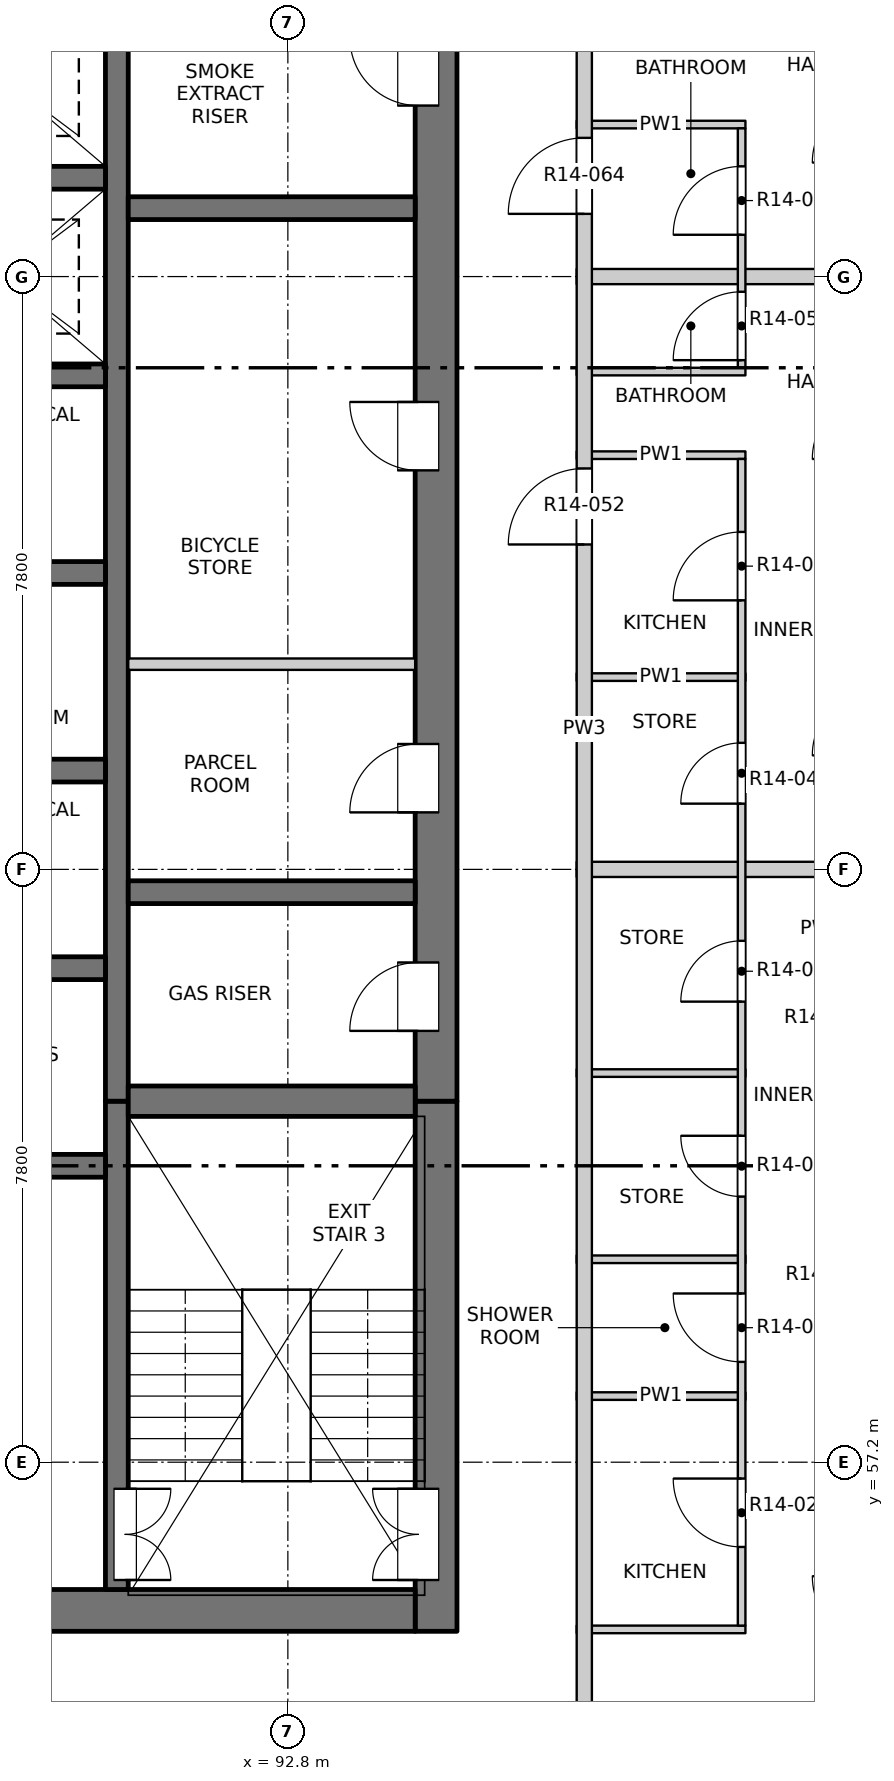
"""IFC4 building model, lengths in metres.
Left out: names, types, materials, properties, quantities, classifications, styles, units other than length and angle.
Written with IfcOpenShell. Run it as: python <this file> out.ifc"""

import sys

from ifc_helpers import new_model, si_unit, direction, frame, frame_2d, origin, place, context, subcontext, project, spatial, rectangle, extrude, element, fill, save


model = new_model("IFC4")
c1 = context("Model", 3, precision=1e-05, world=origin(), true_north=direction((0.0, 1.0)))
c2 = subcontext(c1, "Body", "Model", "MODEL_VIEW")
j1 = project(units=[si_unit("LENGTHUNIT", "METRE"), si_unit("PLANEANGLEUNIT", "RADIAN")], contexts=[c1])
p1 = place(None, origin())
s1 = spatial("IfcSite", under=j1, at=p1, CompositionType="ELEMENT")
p2 = place(p1, origin())
s2 = spatial("IfcBuilding", under=s1, at=p2, CompositionType="ELEMENT")
p3 = place(p2, frame((0.0, 0.0, 148.6)))
s3 = spatial("IfcBuildingStorey", under=s2, at=p3, CompositionType="ELEMENT", Elevation=148.6)
p4 = place(p3, frame((94.75, 54.975, -0.3), z_axis=(0.0, 0.0, 1.0), x_axis=(0.0, 1.0, 0.0)))
e1 = element("IfcWall", 1, at=p4, inside=s3, PredefinedType="SOLIDWALL", context=c2, shape_type="SweptSolid", body=[
    extrude(rectangle(XDim=6.975, YDim=0.55, at=frame_2d((3.487, 0.0))), origin(), (0.0, 0.0, 1.0), 3.45),
])
p5 = place(p4, frame((0.675, 0.0, 0.3)))
e2 = element("IfcOpeningElement", 2, at=p5, cuts=e1, PredefinedType="OPENING", context=c2, shape_type="SweptSolid", body=[
    extrude(rectangle(XDim=1.2, YDim=2.1, at=frame_2d((0.6, 1.05))), frame((0.0, 0.285, 0.0), z_axis=(0.0, -1.0, 0.0), x_axis=(1.0, 0.0, 0.0)), (0.0, 0.0, 1.0), 0.57),
])
p6 = place(p3, frame((94.75, 61.95, -0.3), z_axis=(0.0, 0.0, 1.0), x_axis=(0.0, 1.0, 0.0)))
e3 = element("IfcWall", 3, at=p6, inside=s3, PredefinedType="SOLIDWALL", context=c2, shape_type="SweptSolid", body=[
    extrude(rectangle(XDim=15.35, YDim=0.55, at=frame_2d((7.675, 0.0))), origin(), (0.0, 0.0, 1.0), 3.45),
])
p7 = place(p6, frame((0.925, 0.0, 0.3)))
e4 = element("IfcOpeningElement", 4, at=p7, cuts=e3, PredefinedType="OPENING", context=c2, shape_type="SweptSolid", body=[
    extrude(rectangle(XDim=0.9, YDim=2.1, at=frame_2d((0.45, 1.05))), frame((0.0, 0.285, 0.0), z_axis=(0.0, -1.0, 0.0), x_axis=(1.0, 0.0, 0.0)), (0.0, 0.0, 1.0), 0.57),
])
p8 = place(p6, frame((3.8, 0.0, 0.3)))
e5 = element("IfcOpeningElement", 5, at=p8, cuts=e3, PredefinedType="OPENING", context=c2, shape_type="SweptSolid", body=[
    extrude(rectangle(XDim=0.9, YDim=2.1, at=frame_2d((0.45, 1.05))), frame((0.0, 0.285, 0.0), z_axis=(0.0, -1.0, 0.0), x_axis=(1.0, 0.0, 0.0)), (0.0, 0.0, 1.0), 0.57),
])
p9 = place(p6, frame((8.3, 0.0, 0.3)))
e6 = element("IfcOpeningElement", 6, at=p9, cuts=e3, PredefinedType="OPENING", context=c2, shape_type="SweptSolid", body=[
    extrude(rectangle(XDim=0.9, YDim=2.1, at=frame_2d((0.45, 1.05))), frame((0.0, 0.285, 0.0), z_axis=(0.0, -1.0, 0.0), x_axis=(1.0, 0.0, 0.0)), (0.0, 0.0, 1.0), 0.57),
])
p10 = place(p6, frame((13.1, 0.0, 0.3)))
e7 = element("IfcOpeningElement", 7, at=p10, cuts=e3, PredefinedType="OPENING", context=c2, shape_type="SweptSolid", body=[
    extrude(rectangle(XDim=0.9, YDim=2.1, at=frame_2d((0.45, 1.05))), frame((0.0, 0.285, 0.0), z_axis=(0.0, -1.0, 0.0), x_axis=(1.0, 0.0, 0.0)), (0.0, 0.0, 1.0), 0.57),
])
p11 = place(p3, frame((75.525, 55.25, -0.3), z_axis=(0.0, 0.0, 1.0), x_axis=(1.0, 0.0, 0.0)))
e8 = element("IfcWall", 8, at=p11, inside=s3, PredefinedType="SOLIDWALL", context=c2, shape_type="SweptSolid", body=[
    extrude(rectangle(XDim=18.95, YDim=0.55, at=frame_2d((9.475, 0.0))), origin(), (0.0, 0.0, 1.0), 3.45),
])
p12 = place(p11, frame((8.725, 0.0, 0.3)))
e9 = element("IfcOpeningElement", 9, at=p12, cuts=e8, PredefinedType="OPENING", context=c2, shape_type="SweptSolid", body=[
    extrude(rectangle(XDim=1.5, YDim=2.1, at=frame_2d((0.75, 1.05))), frame((0.0, 0.285, 0.0), z_axis=(0.0, -1.0, 0.0), x_axis=(1.0, 0.0, 0.0)), (0.0, 0.0, 1.0), 0.57),
])
p13 = place(p3, frame((90.55, 55.525, -0.3), z_axis=(0.0, 0.0, 1.0), x_axis=(0.0, 1.0, 0.0)))
e10 = element("IfcWall", 10, at=p13, inside=s3, PredefinedType="SOLIDWALL", context=c2, shape_type="SweptSolid", body=[
    extrude(rectangle(XDim=6.425, YDim=0.3, at=frame_2d((3.212, 0.0))), origin(), (0.0, 0.0, 1.0), 3.45),
])
p14 = place(p13, frame((0.125, 0.0, 0.3)))
e11 = element("IfcOpeningElement", 11, at=p14, cuts=e10, PredefinedType="OPENING", context=c2, shape_type="SweptSolid", body=[
    extrude(rectangle(XDim=1.2, YDim=2.1, at=frame_2d((0.6, 1.05))), frame((0.0, 0.16, 0.0), z_axis=(0.0, -1.0, 0.0), x_axis=(1.0, 0.0, 0.0)), (0.0, 0.0, 1.0), 0.32),
])
p15 = place(p3, frame((90.55, 61.95, -0.3), z_axis=(0.0, 0.0, 1.0), x_axis=(0.0, 1.0, 0.0)))
e12 = element("IfcWall", 12, at=p15, inside=s3, PredefinedType="SOLIDWALL", context=c2, shape_type="SweptSolid", body=[
    extrude(rectangle(XDim=15.35, YDim=0.3, at=frame_2d((7.675, 0.0))), origin(), (0.0, 0.0, 1.0), 3.45),
])
for number, where, z_axis, x_axis in (
    (13, (87.4, 61.1, -0.3), (0.0, 0.0, 1.0), (1.0, 0.0, 0.0)),
    (14, (87.4, 63.7, -0.3), (0.0, 0.0, 1.0), (1.0, 0.0, 0.0)),
    (15, (87.4, 66.3, -0.3), (0.0, 0.0, 1.0), (1.0, 0.0, 0.0)),
    (16, (87.4, 68.9, -0.3), (0.0, 0.0, 1.0), (1.0, 0.0, 0.0)),
    (17, (87.4, 71.5, -0.3), (0.0, 0.0, 1.0), (1.0, 0.0, 0.0)),
    (18, (87.4, 74.1, -0.3), (0.0, 0.0, 1.0), (1.0, 0.0, 0.0)),
):
    element("IfcWall", number, at=place(p3, frame(where, z_axis=z_axis, x_axis=x_axis)), inside=s3, PredefinedType="SOLIDWALL", context=c2, shape_type="SweptSolid", body=[
        extrude(rectangle(XDim=3.0, YDim=0.3, at=frame_2d((1.5, 0.0))), origin(), (0.0, 0.0, 1.0), 3.45),
    ])
p16 = place(p3, frame((90.7, 61.95, -0.3), z_axis=(0.0, 0.0, 1.0), x_axis=(1.0, 0.0, 0.0)))
e19 = element("IfcWall", 19, at=p16, inside=s3, PredefinedType="SOLIDWALL", context=c2, shape_type="SweptSolid", body=[
    extrude(rectangle(XDim=3.775, YDim=0.4, at=frame_2d((1.888, 0.0))), origin(), (0.0, 0.0, 1.0), 3.45),
])
for number, where, z_axis, x_axis in (
    (20, (90.7, 64.7, -0.3), (0.0, 0.0, 1.0), (1.0, 0.0, 0.0)),
    (21, (90.7, 73.7, -0.3), (0.0, 0.0, 1.0), (1.0, 0.0, 0.0)),
):
    element("IfcWall", number, at=place(p3, frame(where, z_axis=z_axis, x_axis=x_axis)), inside=s3, PredefinedType="SOLIDWALL", context=c2, shape_type="SweptSolid", body=[
        extrude(rectangle(XDim=3.775, YDim=0.3, at=frame_2d((1.888, 0.0))), origin(), (0.0, 0.0, 1.0), 3.45),
    ])
for number, where, z_axis, x_axis in (
    (22, (96.6, 55.0, 0.0), (0.0, 0.0, 1.0), (1.0, 0.0, 0.0)),
    (23, (96.6, 58.07, 0.0), (0.0, 0.0, 1.0), (1.0, 0.0, 0.0)),
    (24, (96.6, 59.87, 0.0), (0.0, 0.0, 1.0), (1.0, 0.0, 0.0)),
    (25, (96.6, 62.32, 0.0), (0.0, 0.0, 1.0), (1.0, 0.0, 0.0)),
):
    element("IfcWall", number, at=place(p3, frame(where, z_axis=z_axis, x_axis=x_axis)), inside=s3, PredefinedType="PARTITIONING", context=c2, shape_type="SweptSolid", body=[
        extrude(rectangle(XDim=2.22, YDim=0.1, at=frame_2d((1.11, 0.0))), origin(), (0.0, 0.0, 1.0), 3.15),
    ])
p17 = place(p3, frame((96.6, 65.0, 0.0), z_axis=(0.0, 0.0, 1.0), x_axis=(1.0, 0.0, 0.0)))
e26 = element("IfcWall", 26, at=p17, inside=s3, PredefinedType="PARTITIONING", context=c2, shape_type="SweptSolid", body=[
    extrude(rectangle(XDim=7.6, YDim=0.2, at=frame_2d((3.8, 0.0))), origin(), (0.0, 0.0, 1.0), 3.15),
])
p18 = place(p3, frame((96.6, 67.53, 0.0), z_axis=(0.0, 0.0, 1.0), x_axis=(1.0, 0.0, 0.0)))
e27 = element("IfcWall", 27, at=p18, inside=s3, PredefinedType="PARTITIONING", context=c2, shape_type="SweptSolid", body=[
    extrude(rectangle(XDim=2.22, YDim=0.1, at=frame_2d((1.11, 0.0))), origin(), (0.0, 0.0, 1.0), 3.15),
])
p19 = place(p3, frame((90.7, 67.7, 0.0), z_axis=(0.0, 0.0, 1.0), x_axis=(1.0, 0.0, 0.0)))
e28 = element("IfcWall", 28, at=p19, inside=s3, PredefinedType="PARTITIONING", context=c2, shape_type="SweptSolid", body=[
    extrude(rectangle(XDim=3.775, YDim=0.15, at=frame_2d((1.887, 0.0))), origin(), (0.0, 0.0, 1.0), 3.15),
])
for number, where, z_axis, x_axis in (
    (29, (96.6, 70.45, 0.0), (0.0, 0.0, 1.0), (1.0, 0.0, 0.0)),
    (30, (96.6, 71.55, 0.0), (0.0, 0.0, 1.0), (1.0, 0.0, 0.0)),
):
    element("IfcWall", number, at=place(p3, frame(where, z_axis=z_axis, x_axis=x_axis)), inside=s3, PredefinedType="PARTITIONING", context=c2, shape_type="SweptSolid", body=[
        extrude(rectangle(XDim=2.22, YDim=0.1, at=frame_2d((1.11, 0.0))), origin(), (0.0, 0.0, 1.0), 3.15),
    ])
p20 = place(p3, frame((96.6, 72.8, 0.0), z_axis=(0.0, 0.0, 1.0), x_axis=(1.0, 0.0, 0.0)))
e31 = element("IfcWall", 31, at=p20, inside=s3, PredefinedType="PARTITIONING", context=c2, shape_type="SweptSolid", body=[
    extrude(rectangle(XDim=7.6, YDim=0.2, at=frame_2d((3.8, 0.0))), origin(), (0.0, 0.0, 1.0), 3.15),
])
p21 = place(p3, frame((96.6, 74.8, 0.0), z_axis=(0.0, 0.0, 1.0), x_axis=(1.0, 0.0, 0.0)))
e32 = element("IfcWall", 32, at=p21, inside=s3, PredefinedType="PARTITIONING", context=c2, shape_type="SweptSolid", body=[
    extrude(rectangle(XDim=2.22, YDim=0.1, at=frame_2d((1.11, 0.0))), origin(), (0.0, 0.0, 1.0), 3.15),
])
p22 = place(p3, frame((96.7, 49.5, 0.0), z_axis=(0.0, 0.0, 1.0), x_axis=(0.0, 1.0, 0.0)))
e33 = element("IfcWall", 33, at=p22, inside=s3, PredefinedType="PARTITIONING", context=c2, shape_type="SweptSolid", body=[
    extrude(rectangle(XDim=34.7, YDim=0.2, at=frame_2d((17.35, 0.0))), origin(), (0.0, 0.0, 1.0), 3.15),
])
p23 = place(p22, frame((3.225, 0.0, 0.0)))
e34 = element("IfcOpeningElement", 34, at=p23, cuts=e33, PredefinedType="OPENING", context=c2, shape_type="SweptSolid", body=[
    extrude(rectangle(XDim=1.0, YDim=2.1, at=frame_2d((0.5, 1.05))), frame((0.0, 0.11, 0.0), z_axis=(0.0, -1.0, 0.0), x_axis=(1.0, 0.0, 0.0)), (0.0, 0.0, 1.0), 0.22),
])
p24 = place(p22, frame((19.775, 0.0, 0.0)))
e35 = element("IfcOpeningElement", 35, at=p24, cuts=e33, PredefinedType="OPENING", context=c2, shape_type="SweptSolid", body=[
    extrude(rectangle(XDim=1.0, YDim=2.1, at=frame_2d((0.5, 1.05))), frame((0.0, 0.11, 0.0), z_axis=(0.0, -1.0, 0.0), x_axis=(1.0, 0.0, 0.0)), (0.0, 0.0, 1.0), 0.22),
])
p25 = place(p22, frame((24.125, 0.0, 0.0)))
e36 = element("IfcOpeningElement", 36, at=p25, cuts=e33, PredefinedType="OPENING", context=c2, shape_type="SweptSolid", body=[
    extrude(rectangle(XDim=1.0, YDim=2.1, at=frame_2d((0.5, 1.05))), frame((0.0, 0.11, 0.0), z_axis=(0.0, -1.0, 0.0), x_axis=(1.0, 0.0, 0.0)), (0.0, 0.0, 1.0), 0.22),
])
p26 = place(p3, frame((98.77, 55.05, 0.0), z_axis=(0.0, 0.0, 1.0), x_axis=(0.0, 1.0, 0.0)))
e37 = element("IfcWall", 37, at=p26, inside=s3, PredefinedType="PARTITIONING", context=c2, shape_type="SweptSolid", body=[
    extrude(rectangle(XDim=15.35, YDim=0.1, at=frame_2d((7.675, 0.0))), origin(), (0.0, 0.0, 1.0), 3.15),
])
p27 = place(p26, frame((1.035, 0.0, 0.0)))
e38 = element("IfcOpeningElement", 38, at=p27, cuts=e37, PredefinedType="OPENING", context=c2, shape_type="SweptSolid", body=[
    extrude(rectangle(XDim=0.9, YDim=2.1, at=frame_2d((0.45, 1.05))), frame((0.0, 0.06, 0.0), z_axis=(0.0, -1.0, 0.0), x_axis=(1.0, 0.0, 0.0)), (0.0, 0.0, 1.0), 0.12),
])
p28 = place(p26, frame((3.47, 0.0, 0.0)))
e39 = element("IfcOpeningElement", 39, at=p28, cuts=e37, PredefinedType="OPENING", context=c2, shape_type="SweptSolid", body=[
    extrude(rectangle(XDim=0.9, YDim=2.1, at=frame_2d((0.45, 1.05))), frame((0.0, 0.06, 0.0), z_axis=(0.0, -1.0, 0.0), x_axis=(1.0, 0.0, 0.0)), (0.0, 0.0, 1.0), 0.12),
])
p29 = place(p26, frame((5.645, 0.0, 0.0)))
e40 = element("IfcOpeningElement", 40, at=p29, cuts=e37, PredefinedType="OPENING", context=c2, shape_type="SweptSolid", body=[
    extrude(rectangle(XDim=0.8, YDim=2.1, at=frame_2d((0.4, 1.05))), frame((0.0, 0.06, 0.0), z_axis=(0.0, -1.0, 0.0), x_axis=(1.0, 0.0, 0.0)), (0.0, 0.0, 1.0), 0.12),
])
p30 = place(p26, frame((8.21, 0.0, 0.0)))
e41 = element("IfcOpeningElement", 41, at=p30, cuts=e37, PredefinedType="OPENING", context=c2, shape_type="SweptSolid", body=[
    extrude(rectangle(XDim=0.8, YDim=2.1, at=frame_2d((0.4, 1.05))), frame((0.0, 0.06, 0.0), z_axis=(0.0, -1.0, 0.0), x_axis=(1.0, 0.0, 0.0)), (0.0, 0.0, 1.0), 0.12),
])
p31 = place(p26, frame((10.815, 0.0, 0.0)))
e42 = element("IfcOpeningElement", 42, at=p31, cuts=e37, PredefinedType="OPENING", context=c2, shape_type="SweptSolid", body=[
    extrude(rectangle(XDim=0.8, YDim=2.1, at=frame_2d((0.4, 1.05))), frame((0.0, 0.06, 0.0), z_axis=(0.0, -1.0, 0.0), x_axis=(1.0, 0.0, 0.0)), (0.0, 0.0, 1.0), 0.12),
])
p32 = place(p26, frame((13.49, 0.0, 0.0)))
e43 = element("IfcOpeningElement", 43, at=p32, cuts=e37, PredefinedType="OPENING", context=c2, shape_type="SweptSolid", body=[
    extrude(rectangle(XDim=0.9, YDim=2.1, at=frame_2d((0.45, 1.05))), frame((0.0, 0.06, 0.0), z_axis=(0.0, -1.0, 0.0), x_axis=(1.0, 0.0, 0.0)), (0.0, 0.0, 1.0), 0.12),
])
p33 = place(p3, frame((98.77, 71.6, 0.0), z_axis=(0.0, 0.0, 1.0), x_axis=(0.0, 1.0, 0.0)))
e44 = element("IfcWall", 44, at=p33, inside=s3, PredefinedType="PARTITIONING", context=c2, shape_type="SweptSolid", body=[
    extrude(rectangle(XDim=3.15, YDim=0.1, at=frame_2d((1.575, 0.0))), origin(), (0.0, 0.0, 1.0), 3.15),
])
p34 = place(p33, frame((0.1, 0.0, 0.0)))
e45 = element("IfcOpeningElement", 45, at=p34, cuts=e44, PredefinedType="OPENING", context=c2, shape_type="SweptSolid", body=[
    extrude(rectangle(XDim=0.9, YDim=2.1, at=frame_2d((0.45, 1.05))), frame((0.0, 0.06, 0.0), z_axis=(0.0, -1.0, 0.0), x_axis=(1.0, 0.0, 0.0)), (0.0, 0.0, 1.0), 0.12),
])
p35 = place(p33, frame((1.75, 0.0, 0.0)))
e46 = element("IfcOpeningElement", 46, at=p35, cuts=e44, PredefinedType="OPENING", context=c2, shape_type="SweptSolid", body=[
    extrude(rectangle(XDim=0.9, YDim=2.1, at=frame_2d((0.45, 1.05))), frame((0.0, 0.06, 0.0), z_axis=(0.0, -1.0, 0.0), x_axis=(1.0, 0.0, 0.0)), (0.0, 0.0, 1.0), 0.12),
])
p36 = place(p14, origin())
e47 = element("IfcDoor", 47, at=p36, inside=s3, OperationType="DOUBLE_DOOR_SINGLE_SWING", PredefinedType="DOOR", context=c2, shape_type="SweptSolid", body=[
    extrude(rectangle(XDim=1.2, YDim=2.1, at=frame_2d((0.6, 1.05))), frame((0.0, -0.085, 0.0), z_axis=(0.0, -1.0, 0.0), x_axis=(1.0, 0.0, 0.0)), (0.0, 0.0, 1.0), 0.05),
])
fill(e11, e47)
p37 = place(p5, origin())
e48 = element("IfcDoor", 48, at=p37, inside=s3, OperationType="DOUBLE_DOOR_SINGLE_SWING", PredefinedType="DOOR", context=c2, shape_type="SweptSolid", body=[
    extrude(rectangle(XDim=1.2, YDim=2.1, at=frame_2d((0.6, 1.05))), frame((0.0, 0.26, 0.0), z_axis=(0.0, -1.0, 0.0), x_axis=(1.0, 0.0, 0.0)), (0.0, 0.0, 1.0), 0.05),
])
fill(e2, e48)
p38 = place(p27, origin())
e49 = element("IfcDoor", 49, at=p38, inside=s3, OperationType="SINGLE_SWING_RIGHT", PredefinedType="DOOR", context=c2, shape_type="SweptSolid", body=[
    extrude(rectangle(XDim=0.9, YDim=2.1, at=frame_2d((0.45, 1.05))), frame((0.0, 0.025, 0.0), z_axis=(0.0, -1.0, 0.0), x_axis=(1.0, 0.0, 0.0)), (0.0, 0.0, 1.0), 0.05),
])
fill(e38, e49)
p39 = place(p28, origin())
e50 = element("IfcDoor", 50, at=p39, inside=s3, OperationType="SINGLE_SWING_RIGHT", PredefinedType="DOOR", context=c2, shape_type="SweptSolid", body=[
    extrude(rectangle(XDim=0.9, YDim=2.1, at=frame_2d((0.45, 1.05))), frame((0.0, 0.025, 0.0), z_axis=(0.0, -1.0, 0.0), x_axis=(1.0, 0.0, 0.0)), (0.0, 0.0, 1.0), 0.05),
])
fill(e39, e50)
p40 = place(p29, origin())
e51 = element("IfcDoor", 51, at=p40, inside=s3, OperationType="SINGLE_SWING_RIGHT", PredefinedType="DOOR", context=c2, shape_type="SweptSolid", body=[
    extrude(rectangle(XDim=0.8, YDim=2.1, at=frame_2d((0.4, 1.05))), frame((0.0, 0.025, 0.0), z_axis=(0.0, -1.0, 0.0), x_axis=(1.0, 0.0, 0.0)), (0.0, 0.0, 1.0), 0.05),
])
fill(e40, e51)
p41 = place(p7, origin())
e52 = element("IfcDoor", 52, at=p41, inside=s3, OperationType="SINGLE_SWING_LEFT", PredefinedType="DOOR", context=c2, shape_type="SweptSolid", body=[
    extrude(rectangle(XDim=0.9, YDim=2.1, at=frame_2d((0.45, 1.05))), frame((0.0, 0.26, 0.0), z_axis=(0.0, -1.0, 0.0), x_axis=(1.0, 0.0, 0.0)), (0.0, 0.0, 1.0), 0.05),
])
fill(e4, e52)
p42 = place(p30, origin())
e53 = element("IfcDoor", 53, at=p42, inside=s3, OperationType="SINGLE_SWING_LEFT", PredefinedType="DOOR", context=c2, shape_type="SweptSolid", body=[
    extrude(rectangle(XDim=0.8, YDim=2.1, at=frame_2d((0.4, 1.05))), frame((0.0, 0.025, 0.0), z_axis=(0.0, -1.0, 0.0), x_axis=(1.0, 0.0, 0.0)), (0.0, 0.0, 1.0), 0.05),
])
fill(e41, e53)
p43 = place(p8, origin())
e54 = element("IfcDoor", 54, at=p43, inside=s3, OperationType="SINGLE_SWING_LEFT", PredefinedType="DOOR", context=c2, shape_type="SweptSolid", body=[
    extrude(rectangle(XDim=0.9, YDim=2.1, at=frame_2d((0.45, 1.05))), frame((0.0, 0.26, 0.0), z_axis=(0.0, -1.0, 0.0), x_axis=(1.0, 0.0, 0.0)), (0.0, 0.0, 1.0), 0.05),
])
fill(e5, e54)
p44 = place(p31, origin())
e55 = element("IfcDoor", 55, at=p44, inside=s3, OperationType="SINGLE_SWING_LEFT", PredefinedType="DOOR", context=c2, shape_type="SweptSolid", body=[
    extrude(rectangle(XDim=0.8, YDim=2.1, at=frame_2d((0.4, 1.05))), frame((0.0, 0.025, 0.0), z_axis=(0.0, -1.0, 0.0), x_axis=(1.0, 0.0, 0.0)), (0.0, 0.0, 1.0), 0.05),
])
fill(e42, e55)
p45 = place(p32, origin())
e56 = element("IfcDoor", 56, at=p45, inside=s3, OperationType="SINGLE_SWING_LEFT", PredefinedType="DOOR", context=c2, shape_type="SweptSolid", body=[
    extrude(rectangle(XDim=0.9, YDim=2.1, at=frame_2d((0.45, 1.05))), frame((0.0, 0.025, 0.0), z_axis=(0.0, -1.0, 0.0), x_axis=(1.0, 0.0, 0.0)), (0.0, 0.0, 1.0), 0.05),
])
fill(e43, e56)
p46 = place(p24, origin())
e57 = element("IfcDoor", 57, at=p46, inside=s3, OperationType="SINGLE_SWING_RIGHT", PredefinedType="DOOR", context=c2, shape_type="SweptSolid", body=[
    extrude(rectangle(XDim=1.0, YDim=2.1, at=frame_2d((0.5, 1.05))), frame((0.0, 0.025, 0.0), z_axis=(0.0, -1.0, 0.0), x_axis=(1.0, 0.0, 0.0)), (0.0, 0.0, 1.0), 0.05),
])
fill(e35, e57)
p47 = place(p9, origin())
e58 = element("IfcDoor", 58, at=p47, inside=s3, OperationType="SINGLE_SWING_RIGHT", PredefinedType="DOOR", context=c2, shape_type="SweptSolid", body=[
    extrude(rectangle(XDim=0.9, YDim=2.1, at=frame_2d((0.45, 1.05))), frame((0.0, 0.26, 0.0), z_axis=(0.0, -1.0, 0.0), x_axis=(1.0, 0.0, 0.0)), (0.0, 0.0, 1.0), 0.05),
])
fill(e6, e58)
p48 = place(p34, origin())
e59 = element("IfcDoor", 59, at=p48, inside=s3, OperationType="SINGLE_SWING_LEFT", PredefinedType="DOOR", context=c2, shape_type="SweptSolid", body=[
    extrude(rectangle(XDim=0.9, YDim=2.1, at=frame_2d((0.45, 1.05))), frame((0.0, 0.025, 0.0), z_axis=(0.0, -1.0, 0.0), x_axis=(1.0, 0.0, 0.0)), (0.0, 0.0, 1.0), 0.05),
])
fill(e45, e59)
p49 = place(p35, origin())
e60 = element("IfcDoor", 60, at=p49, inside=s3, OperationType="SINGLE_SWING_LEFT", PredefinedType="DOOR", context=c2, shape_type="SweptSolid", body=[
    extrude(rectangle(XDim=0.9, YDim=2.1, at=frame_2d((0.45, 1.05))), frame((0.0, 0.025, 0.0), z_axis=(0.0, -1.0, 0.0), x_axis=(1.0, 0.0, 0.0)), (0.0, 0.0, 1.0), 0.05),
])
fill(e46, e60)
p50 = place(p25, origin())
e61 = element("IfcDoor", 61, at=p50, inside=s3, OperationType="SINGLE_SWING_RIGHT", PredefinedType="DOOR", context=c2, shape_type="SweptSolid", body=[
    extrude(rectangle(XDim=1.0, YDim=2.1, at=frame_2d((0.5, 1.05))), frame((0.0, 0.025, 0.0), z_axis=(0.0, -1.0, 0.0), x_axis=(1.0, 0.0, 0.0)), (0.0, 0.0, 1.0), 0.05),
])
fill(e36, e61)
p51 = place(p10, origin())
e62 = element("IfcDoor", 62, at=p51, inside=s3, OperationType="SINGLE_SWING_RIGHT", PredefinedType="DOOR", context=c2, shape_type="SweptSolid", body=[
    extrude(rectangle(XDim=0.9, YDim=2.1, at=frame_2d((0.45, 1.05))), frame((0.0, 0.26, 0.0), z_axis=(0.0, -1.0, 0.0), x_axis=(1.0, 0.0, 0.0)), (0.0, 0.0, 1.0), 0.05),
])
fill(e7, e62)
save(model, sys.argv[1])
